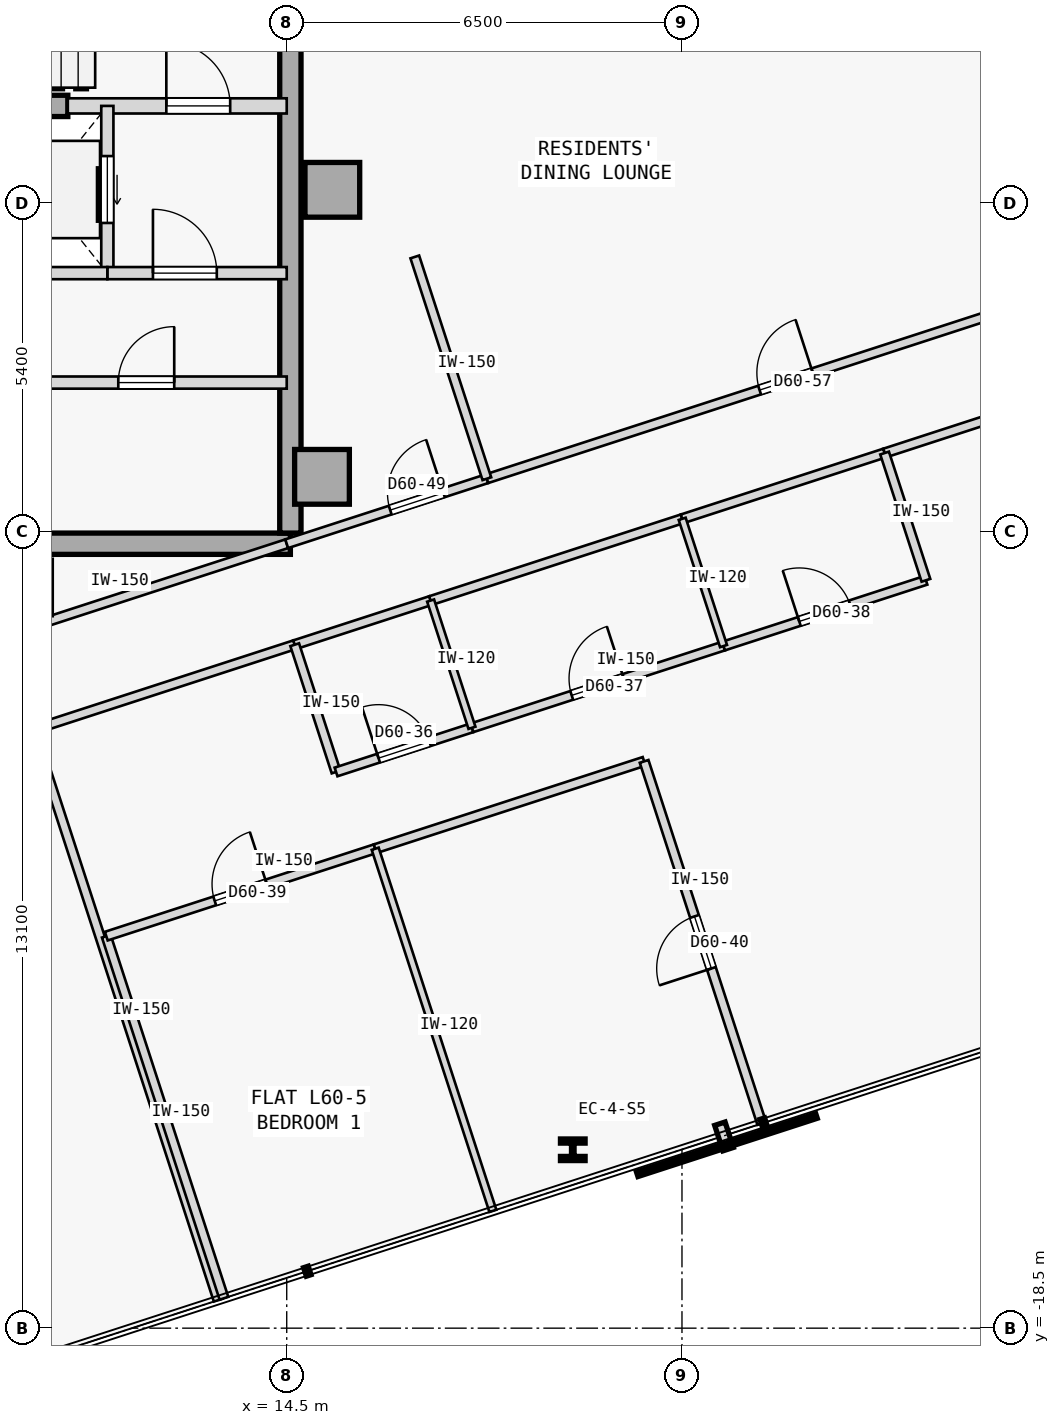
"""IFC4 building model, lengths in metres.
Left out: names, types, materials, properties, quantities, classifications, styles, units other than length and angle.
Written with IfcOpenShell. Run it as: python <this file> out.ifc"""

import sys

from ifc_helpers import new_model, si_unit, direction, frame, frame_2d, origin, origin_2d, place, context, subcontext, project, spatial, rectangle, i_section, extrude, element, fill, save


model = new_model("IFC4")
c1 = context("Model", 3, precision=1e-05, world=origin(), true_north=direction((0.0, 1.0)))
c2 = subcontext(c1, "Body", "Model", "MODEL_VIEW")
j1 = project(units=[si_unit("LENGTHUNIT", "METRE"), si_unit("PLANEANGLEUNIT", "RADIAN")], contexts=[c1])
p1 = place(None, origin())
s1 = spatial("IfcSite", under=j1, at=p1, CompositionType="ELEMENT")
p2 = place(p1, origin())
s2 = spatial("IfcBuilding", under=s1, at=p2, CompositionType="ELEMENT")
p3 = place(p2, frame((0.0, 0.0, 227.65)))
s3 = spatial("IfcBuildingStorey", under=s2, at=p3, CompositionType="ELEMENT", Elevation=227.65)
for number, where, z_axis, x_axis in (
    (1, (15.25, 0.22, 0.0), (0.0, 0.0, 1.0), (1.0, 0.0, 0.0)),
    (2, (15.08, -4.5, 0.0), (0.0, 0.0, 1.0), (1.0, 0.0, 0.0)),
):
    element("IfcColumn", number, at=place(p3, frame(where, z_axis=z_axis, x_axis=x_axis)), inside=s3, PredefinedType="COLUMN", context=c2, shape_type="SweptSolid", body=[
        extrude(rectangle(XDim=0.9, YDim=0.9, at=origin_2d()), origin(), (0.0, 0.0, 1.0), 3.35),
    ])
p4 = place(p3, frame((3.7, -5.6, 0.0), z_axis=(0.0, 0.0, 1.0), x_axis=(1.0, 0.0, 0.0)))
e3 = element("IfcWall", 3, at=p4, inside=s3, PredefinedType="SHEAR", context=c2, shape_type="SweptSolid", body=[
    extrude(rectangle(XDim=10.86, YDim=0.35, at=frame_2d((5.43, 0.0))), origin(), (0.0, 0.0, 1.0), 3.125),
])
p5 = place(p3, frame((14.56, -5.425, 0.0), z_axis=(0.0, 0.0, 1.0), x_axis=(0.0, 1.0, 0.0)))
e4 = element("IfcWall", 4, at=p5, inside=s3, PredefinedType="SHEAR", context=c2, shape_type="SweptSolid", body=[
    extrude(rectangle(XDim=10.85, YDim=0.35, at=frame_2d((5.425, 0.0))), origin(), (0.0, 0.0, 1.0), 3.125),
])
p6 = place(p3, frame((5.75, 1.6, 0.0), z_axis=(0.0, 0.0, 1.0), x_axis=(1.0, 0.0, 0.0)))
e5 = element("IfcWall", 5, at=p6, inside=s3, PredefinedType="SHEAR", context=c2, shape_type="SweptSolid", body=[
    extrude(rectangle(XDim=5.15, YDim=0.35, at=frame_2d((2.575, 0.0))), origin(), (0.0, 0.0, 1.0), 3.125),
])
p7 = place(p3, frame((19.204, -15.566, 0.0), z_axis=(0.0, 0.0, 1.0), x_axis=(1.0, 0.0, 0.0)))
e6 = element("IfcColumn", 6, at=p7, inside=s3, PredefinedType="COLUMN", context=c2, shape_type="SweptSolid", body=[
    extrude(i_section(OverallWidth=0.405, OverallDepth=0.355, WebThickness=0.042, FlangeThickness=0.068, FilletRadius=0.015, at=origin_2d()), origin(), (0.0, 0.0, 1.0), 3.35),
])
p8 = place(p3, frame((10.9, 1.6, 0.0), z_axis=(0.0, 0.0, 1.0), x_axis=(1.0, 0.0, 0.0)))
e7 = element("IfcWall", 7, at=p8, inside=s3, PredefinedType="STANDARD", context=c2, shape_type="SweptSolid", body=[
    extrude(rectangle(XDim=3.6, YDim=0.25, at=frame_2d((1.8, 0.0))), origin(), (0.0, 0.0, 1.0), 3.125),
])
p9 = place(p8, frame((1.62, 0.0, 0.0)))
e8 = element("IfcOpeningElement", 8, at=p9, cuts=e7, PredefinedType="OPENING", context=c2, shape_type="SweptSolid", body=[
    extrude(rectangle(XDim=1.05, YDim=2.15, at=frame_2d((0.525, 1.075))), frame((0.0, 0.135, 0.0), z_axis=(0.0, -1.0, 0.0), x_axis=(1.0, 0.0, 0.0)), (0.0, 0.0, 1.0), 0.27),
])
p10 = place(p3, frame((11.55, -1.15, 0.0), z_axis=(0.0, 0.0, 1.0), x_axis=(0.0, 1.0, 0.0)))
e9 = element("IfcWall", 9, at=p10, inside=s3, PredefinedType="STANDARD", context=c2, shape_type="SweptSolid", body=[
    extrude(rectangle(XDim=2.75, YDim=0.2, at=frame_2d((1.375, 0.0))), origin(), (0.0, 0.0, 1.0), 3.125),
])
p11 = place(p10, frame((0.825, 0.0, 0.0)))
e10 = element("IfcOpeningElement", 10, at=p11, cuts=e9, PredefinedType="OPENING", context=c2, shape_type="SweptSolid", body=[
    extrude(rectangle(XDim=1.1, YDim=2.15, at=frame_2d((0.55, 1.075))), frame((0.0, 0.11, 0.0), z_axis=(0.0, -1.0, 0.0), x_axis=(1.0, 0.0, 0.0)), (0.0, 0.0, 1.0), 0.22),
])
p12 = place(p3, frame((11.55, -1.15, 0.0), z_axis=(0.0, 0.0, 1.0), x_axis=(1.0, 0.0, 0.0)))
e11 = element("IfcWall", 11, at=p12, inside=s3, PredefinedType="STANDARD", context=c2, shape_type="SweptSolid", body=[
    extrude(rectangle(XDim=2.95, YDim=0.2, at=frame_2d((1.475, 0.0))), origin(), (0.0, 0.0, 1.0), 3.125),
])
p13 = place(p12, frame((0.75, 0.0, 0.0)))
e12 = element("IfcOpeningElement", 12, at=p13, cuts=e11, PredefinedType="OPENING", context=c2, shape_type="SweptSolid", body=[
    extrude(rectangle(XDim=1.05, YDim=2.18, at=frame_2d((0.525, 1.09))), frame((0.0, 0.11, 0.0), z_axis=(0.0, -1.0, 0.0), x_axis=(1.0, 0.0, 0.0)), (0.0, 0.0, 1.0), 0.22),
])
p14 = place(p3, frame((9.35, -1.15, 0.0), z_axis=(0.0, 0.0, 1.0), x_axis=(1.0, 0.0, 0.0)))
e13 = element("IfcWall", 13, at=p14, inside=s3, PredefinedType="STANDARD", context=c2, shape_type="SweptSolid", body=[
    extrude(rectangle(XDim=2.2, YDim=0.2, at=frame_2d((1.1, 0.0))), origin(), (0.0, 0.0, 1.0), 3.125),
])
p15 = place(p3, frame((3.7, -2.95, 0.0), z_axis=(0.0, 0.0, 1.0), x_axis=(1.0, 0.0, 0.0)))
e14 = element("IfcWall", 14, at=p15, inside=s3, PredefinedType="STANDARD", context=c2, shape_type="SweptSolid", body=[
    extrude(rectangle(XDim=10.8, YDim=0.2, at=frame_2d((5.4, 0.0))), origin(), (0.0, 0.0, 1.0), 3.125),
])
p16 = place(p15, frame((0.53, 0.0, 0.0)))
e15 = element("IfcOpeningElement", 15, at=p16, cuts=e14, PredefinedType="OPENING", context=c2, shape_type="SweptSolid", body=[
    extrude(rectangle(XDim=1.1, YDim=2.15, at=frame_2d((0.55, 1.075))), frame((0.0, 0.11, 0.0), z_axis=(0.0, -1.0, 0.0), x_axis=(1.0, 0.0, 0.0)), (0.0, 0.0, 1.0), 0.22),
])
p17 = place(p15, frame((3.71, 0.0, 0.0)))
e16 = element("IfcOpeningElement", 16, at=p17, cuts=e14, PredefinedType="OPENING", context=c2, shape_type="SweptSolid", body=[
    extrude(rectangle(XDim=0.92, YDim=2.15, at=frame_2d((0.46, 1.075))), frame((0.0, 0.11, 0.0), z_axis=(0.0, -1.0, 0.0), x_axis=(1.0, 0.0, 0.0)), (0.0, 0.0, 1.0), 0.22),
])
p18 = place(p15, frame((8.03, 0.0, 0.0)))
e17 = element("IfcOpeningElement", 17, at=p18, cuts=e14, PredefinedType="OPENING", context=c2, shape_type="SweptSolid", body=[
    extrude(rectangle(XDim=0.92, YDim=2.15, at=frame_2d((0.46, 1.075))), frame((0.0, 0.11, 0.0), z_axis=(0.0, -1.0, 0.0), x_axis=(1.0, 0.0, 0.0)), (0.0, 0.0, 1.0), 0.22),
])
p19 = place(p3, frame((10.325, -8.66, 0.0), z_axis=(0.0, 0.0, 1.0), x_axis=(0.95106061278, 0.309004386407, 0.0)))
e18 = element("IfcWall", 18, at=p19, inside=s3, PredefinedType="PARTITIONING", context=c2, shape_type="SweptSolid", body=[
    extrude(rectangle(XDim=4.528, YDim=0.15, at=frame_2d((2.264, 0.0))), origin(), (0.0, 0.0, 1.0), 3.125),
])
p20 = place(p3, frame((24.332, -4.109, 0.0), z_axis=(0.0, 0.0, 1.0), x_axis=(0.951058083458, 0.309012171103, 0.0)))
e19 = element("IfcWall", 19, at=p20, inside=s3, PredefinedType="PARTITIONING", context=c2, shape_type="SweptSolid", body=[
    extrude(rectangle(XDim=5.976, YDim=0.15, at=frame_2d((2.988, 0.0))), origin(), (0.0, 0.0, 1.0), 3.125),
])
p21 = place(p20, frame((2.513, 0.0, 0.0)))
e20 = element("IfcOpeningElement", 20, at=p21, cuts=e19, PredefinedType="OPENING", context=c2, shape_type="SweptSolid", body=[
    extrude(rectangle(XDim=0.95, YDim=2.15, at=frame_2d((0.475, 1.075))), frame((0.0, 0.085, 0.0), z_axis=(0.0, -1.0, 0.0), x_axis=(1.0, 0.0, 0.0)), (0.0, 0.0, 1.0), 0.17),
])
p22 = place(p3, frame((14.631, -7.261, 0.0), z_axis=(0.0, 0.0, 1.0), x_axis=(0.951066131077, 0.308987401554, 0.0)))
e21 = element("IfcWall", 21, at=p22, inside=s3, PredefinedType="PARTITIONING", context=c2, shape_type="SweptSolid", body=[
    extrude(rectangle(XDim=2.35, YDim=0.15, at=frame_2d((1.175, 0.0))), origin(), (0.0, 0.0, 1.0), 3.125),
])
p23 = place(p3, frame((16.866, -6.535, 0.0), z_axis=(0.0, 0.0, 1.0), x_axis=(0.951041492154, 0.309063230101, 0.0)))
e22 = element("IfcWall", 22, at=p23, inside=s3, PredefinedType="PARTITIONING", context=c2, shape_type="SweptSolid", body=[
    extrude(rectangle(XDim=4.35, YDim=0.15, at=frame_2d((2.175, 0.0))), origin(), (0.0, 0.0, 1.0), 3.125),
])
p24 = place(p3, frame((21.003, -5.19, 0.0), z_axis=(0.0, 0.0, 1.0), x_axis=(0.951055596592, 0.309019824916, 0.0)))
e23 = element("IfcWall", 23, at=p24, inside=s3, PredefinedType="PARTITIONING", context=c2, shape_type="SweptSolid", body=[
    extrude(rectangle(XDim=3.5, YDim=0.15, at=frame_2d((1.75, 0.0))), origin(), (0.0, 0.0, 1.0), 3.125),
])
p25 = place(p3, frame((7.588, -7.846, 0.0), z_axis=(0.0, 0.0, 1.0), x_axis=(0.951058013903, 0.309012385174, 0.0)))
e24 = element("IfcWall", 24, at=p25, inside=s3, PredefinedType="PARTITIONING", context=c2, shape_type="SweptSolid", body=[
    extrude(rectangle(XDim=7.267, YDim=0.15, at=frame_2d((3.634, 0.0))), origin(), (0.0, 0.0, 1.0), 3.125),
])
p26 = place(p25, frame((0.557, 0.0, 0.0)))
e25 = element("IfcOpeningElement", 25, at=p26, cuts=e24, PredefinedType="OPENING", context=c2, shape_type="SweptSolid", body=[
    extrude(rectangle(XDim=0.92, YDim=2.15, at=frame_2d((0.46, 1.075))), frame((0.0, 0.085, 0.0), z_axis=(0.0, -1.0, 0.0), x_axis=(1.0, 0.0, 0.0)), (0.0, 0.0, 1.0), 0.17),
])
p27 = place(p3, frame((14.5, -5.6, 0.0), z_axis=(0.0, 0.0, 1.0), x_axis=(0.951047546178, 0.309044600193, 0.0)))
e26 = element("IfcWall", 26, at=p27, inside=s3, PredefinedType="PARTITIONING", context=c2, shape_type="SweptSolid", body=[
    extrude(rectangle(XDim=3.461, YDim=0.15, at=frame_2d((1.73, 0.0))), origin(), (0.0, 0.0, 1.0), 3.125),
])
p28 = place(p27, frame((1.79, 0.0, 0.0)))
e27 = element("IfcOpeningElement", 27, at=p28, cuts=e26, PredefinedType="OPENING", context=c2, shape_type="SweptSolid", body=[
    extrude(rectangle(XDim=0.92, YDim=2.15, at=frame_2d((0.46, 1.075))), frame((0.0, 0.085, 0.0), z_axis=(0.0, -1.0, 0.0), x_axis=(1.0, 0.0, 0.0)), (0.0, 0.0, 1.0), 0.17),
])
p29 = place(p3, frame((17.791, -4.531, 0.0), z_axis=(0.0, 0.0, 1.0), x_axis=(0.951056769902, 0.309016213852, 0.0)))
e28 = element("IfcWall", 28, at=p29, inside=s3, PredefinedType="PARTITIONING", context=c2, shape_type="SweptSolid", body=[
    extrude(rectangle(XDim=10.352, YDim=0.15, at=frame_2d((5.176, 0.0))), origin(), (0.0, 0.0, 1.0), 3.125),
])
p30 = place(p29, frame((4.716, 0.0, 0.0)))
e29 = element("IfcOpeningElement", 29, at=p30, cuts=e28, PredefinedType="OPENING", context=c2, shape_type="SweptSolid", body=[
    extrude(rectangle(XDim=0.92, YDim=2.15, at=frame_2d((0.46, 1.075))), frame((0.0, 0.085, 0.0), z_axis=(0.0, -1.0, 0.0), x_axis=(1.0, 0.0, 0.0)), (0.0, 0.0, 1.0), 0.17),
])
p31 = place(p3, frame((27.637, -1.332, 0.0), z_axis=(0.0, 0.0, 1.0), x_axis=(-0.309040411618, 0.951048907253, 0.0)))
e30 = element("IfcWall", 30, at=p31, inside=s3, PredefinedType="PARTITIONING", context=c2, shape_type="SweptSolid", body=[
    extrude(rectangle(XDim=8.826, YDim=0.15, at=frame_2d((4.413, 0.0))), origin(), (0.0, 0.0, 1.0), 3.125),
])
p32 = place(p3, frame((13.372, -18.04, 0.0), z_axis=(0.0, 0.0, 1.0), x_axis=(-0.308999867152, 0.951062081097, 0.0)))
e31 = element("IfcWall", 31, at=p32, inside=s3, PredefinedType="PARTITIONING", context=c2, shape_type="SweptSolid", body=[
    extrude(rectangle(XDim=9.862, YDim=0.15, at=frame_2d((4.931, 0.0))), origin(), (0.0, 0.0, 1.0), 3.125),
])
p33 = place(p3, frame((15.311, -9.353, 0.0), z_axis=(0.0, 0.0, 1.0), x_axis=(-0.308960600764, 0.951074837842, 0.0)))
e32 = element("IfcWall", 32, at=p33, inside=s3, PredefinedType="PARTITIONING", context=c2, shape_type="SweptSolid", body=[
    extrude(rectangle(XDim=2.2, YDim=0.15, at=frame_2d((1.1, 0.0))), origin(), (0.0, 0.0, 1.0), 3.125),
])
p34 = place(p3, frame((15.311, -9.353, 0.0), z_axis=(0.0, 0.0, 1.0), x_axis=(0.951076048914, 0.308956872689, 0.0)))
e33 = element("IfcWall", 33, at=p34, inside=s3, PredefinedType="PARTITIONING", context=c2, shape_type="SweptSolid", body=[
    extrude(rectangle(XDim=2.35, YDim=0.15, at=frame_2d((1.175, 0.0))), origin(), (0.0, 0.0, 1.0), 3.125),
])
p35 = place(p34, frame((0.735, 0.0, 0.0)))
e34 = element("IfcOpeningElement", 34, at=p35, cuts=e33, PredefinedType="OPENING", context=c2, shape_type="SweptSolid", body=[
    extrude(rectangle(XDim=0.88, YDim=2.15, at=frame_2d((0.44, 1.075))), frame((0.0, 0.085, 0.0), z_axis=(0.0, -1.0, 0.0), x_axis=(1.0, 0.0, 0.0)), (0.0, 0.0, 1.0), 0.17),
])
p36 = place(p3, frame((17.546, -8.627, 0.0), z_axis=(0.0, 0.0, 1.0), x_axis=(0.951052627573, 0.309028962374, 0.0)))
e35 = element("IfcWall", 35, at=p36, inside=s3, PredefinedType="PARTITIONING", context=c2, shape_type="SweptSolid", body=[
    extrude(rectangle(XDim=4.35, YDim=0.15, at=frame_2d((2.175, 0.0))), origin(), (0.0, 0.0, 1.0), 3.125),
])
p37 = place(p36, frame((1.725, 0.0, 0.0)))
e36 = element("IfcOpeningElement", 36, at=p37, cuts=e35, PredefinedType="OPENING", context=c2, shape_type="SweptSolid", body=[
    extrude(rectangle(XDim=0.9, YDim=2.15, at=frame_2d((0.45, 1.075))), frame((0.0, 0.085, 0.0), z_axis=(0.0, -1.0, 0.0), x_axis=(1.0, 0.0, 0.0)), (0.0, 0.0, 1.0), 0.17),
])
p38 = place(p3, frame((21.683, -7.283, 0.0), z_axis=(0.0, 0.0, 1.0), x_axis=(0.951062257173, 0.308999325213, 0.0)))
e37 = element("IfcWall", 37, at=p38, inside=s3, PredefinedType="PARTITIONING", context=c2, shape_type="SweptSolid", body=[
    extrude(rectangle(XDim=3.5, YDim=0.15, at=frame_2d((1.75, 0.0))), origin(), (0.0, 0.0, 1.0), 3.125),
])
p39 = place(p38, frame((1.31, 0.0, 0.0)))
e38 = element("IfcOpeningElement", 38, at=p39, cuts=e37, PredefinedType="OPENING", context=c2, shape_type="SweptSolid", body=[
    extrude(rectangle(XDim=0.88, YDim=2.15, at=frame_2d((0.44, 1.075))), frame((0.0, 0.085, 0.0), z_axis=(0.0, -1.0, 0.0), x_axis=(1.0, 0.0, 0.0)), (0.0, 0.0, 1.0), 0.17),
])
p40 = place(p3, frame((25.012, -6.201, 0.0), z_axis=(0.0, 0.0, 1.0), x_axis=(-0.309028364152, 0.951052821956, 0.0)))
e39 = element("IfcWall", 39, at=p40, inside=s3, PredefinedType="PARTITIONING", context=c2, shape_type="SweptSolid", body=[
    extrude(rectangle(XDim=2.2, YDim=0.15, at=frame_2d((1.1, 0.0))), origin(), (0.0, 0.0, 1.0), 3.125),
])
p41 = place(p3, frame((13.468, -18.009, 0.0), z_axis=(0.0, 0.0, 1.0), x_axis=(-0.309013782848, 0.951057559777, 0.0)))
e40 = element("IfcWall", 40, at=p41, inside=s3, PredefinedType="PARTITIONING", context=c2, shape_type="SweptSolid", body=[
    extrude(rectangle(XDim=6.262, YDim=0.15, at=frame_2d((3.131, 0.0))), origin(), (0.0, 0.0, 1.0), 3.125),
])
p42 = place(p3, frame((11.532, -12.053, 0.0), z_axis=(0.0, 0.0, 1.0), x_axis=(0.951065702951, 0.308988719326, 0.0)))
e41 = element("IfcWall", 41, at=p42, inside=s3, PredefinedType="PARTITIONING", context=c2, shape_type="SweptSolid", body=[
    extrude(rectangle(XDim=4.65, YDim=0.15, at=frame_2d((2.325, 0.0))), origin(), (0.0, 0.0, 1.0), 3.125),
])
p43 = place(p42, frame((1.875, 0.0, 0.0)))
e42 = element("IfcOpeningElement", 42, at=p43, cuts=e41, PredefinedType="OPENING", context=c2, shape_type="SweptSolid", body=[
    extrude(rectangle(XDim=0.9, YDim=2.15, at=frame_2d((0.45, 1.075))), frame((0.0, 0.085, 0.0), z_axis=(0.0, -1.0, 0.0), x_axis=(1.0, 0.0, 0.0)), (0.0, 0.0, 1.0), 0.17),
])
p44 = place(p3, frame((15.955, -10.616, 0.0), z_axis=(0.0, 0.0, 1.0), x_axis=(0.951050272606, 0.309036209813, 0.0)))
e43 = element("IfcWall", 43, at=p44, inside=s3, PredefinedType="PARTITIONING", context=c2, shape_type="SweptSolid", body=[
    extrude(rectangle(XDim=4.65, YDim=0.15, at=frame_2d((2.325, 0.0))), origin(), (0.0, 0.0, 1.0), 3.125),
])
p45 = place(p3, frame((22.312, -15.135, 0.0), z_axis=(0.0, 0.0, 1.0), x_axis=(-0.309013782848, 0.951057559777, 0.0)))
e44 = element("IfcWall", 44, at=p45, inside=s3, PredefinedType="PARTITIONING", context=c2, shape_type="SweptSolid", body=[
    extrude(rectangle(XDim=6.262, YDim=0.15, at=frame_2d((3.131, 0.0))), origin(), (0.0, 0.0, 1.0), 3.125),
])
p46 = place(p45, frame((2.681, 0.0, 0.0)))
e45 = element("IfcOpeningElement", 45, at=p46, cuts=e44, PredefinedType="OPENING", context=c2, shape_type="SweptSolid", body=[
    extrude(rectangle(XDim=0.9, YDim=2.15, at=frame_2d((0.45, 1.075))), frame((0.0, 0.085, 0.0), z_axis=(0.0, -1.0, 0.0), x_axis=(1.0, 0.0, 0.0)), (0.0, 0.0, 1.0), 0.17),
])
p47 = place(p3, frame((17.546, -8.627, 0.0), z_axis=(0.0, 0.0, 1.0), x_axis=(-0.309060979314, 0.951042223598, 0.0)))
e46 = element("IfcWall", 46, at=p47, inside=s3, PredefinedType="PARTITIONING", context=c2, shape_type="SweptSolid", body=[
    extrude(rectangle(XDim=2.2, YDim=0.12, at=frame_2d((1.1, 0.0))), origin(), (0.0, 0.0, 1.0), 3.125),
])
p48 = place(p3, frame((21.683, -7.283, 0.0), z_axis=(0.0, 0.0, 1.0), x_axis=(-0.30892799396, 0.951085429679, 0.0)))
e47 = element("IfcWall", 47, at=p48, inside=s3, PredefinedType="PARTITIONING", context=c2, shape_type="SweptSolid", body=[
    extrude(rectangle(XDim=2.2, YDim=0.12, at=frame_2d((1.1, 0.0))), origin(), (0.0, 0.0, 1.0), 3.125),
])
p49 = place(p3, frame((17.89, -16.572, 0.0), z_axis=(0.0, 0.0, 1.0), x_axis=(-0.309013782848, 0.951057559777, 0.0)))
e48 = element("IfcWall", 48, at=p49, inside=s3, PredefinedType="PARTITIONING", context=c2, shape_type="SweptSolid", body=[
    extrude(rectangle(XDim=6.262, YDim=0.12, at=frame_2d((3.131, 0.0))), origin(), (0.0, 0.0, 1.0), 3.125),
])
p50 = place(p3, frame((17.791, -4.531, 0.0), z_axis=(0.0, 0.0, 1.0), x_axis=(-0.309018414265, 0.951056054944, 0.0)))
e49 = element("IfcWall", 49, at=p50, inside=s3, PredefinedType="PARTITIONING", context=c2, shape_type="SweptSolid", body=[
    extrude(rectangle(XDim=3.835, YDim=0.15, at=frame_2d((1.917, 0.0))), origin(), (0.0, 0.0, 1.0), 3.125),
])
p51 = place(p9, origin())
e50 = element("IfcDoor", 50, at=p51, inside=s3, OperationType="SINGLE_SWING_LEFT", PredefinedType="DOOR", context=c2, shape_type="SweptSolid", body=[
    extrude(rectangle(XDim=1.05, YDim=2.15, at=frame_2d((0.525, 1.075))), frame((0.0, 0.025, 0.0), z_axis=(0.0, -1.0, 0.0), x_axis=(1.0, 0.0, 0.0)), (0.0, 0.0, 1.0), 0.05),
])
fill(e8, e50)
p52 = place(p13, origin())
e51 = element("IfcDoor", 51, at=p52, inside=s3, OperationType="SINGLE_SWING_LEFT", PredefinedType="DOOR", context=c2, shape_type="SweptSolid", body=[
    extrude(rectangle(XDim=1.05, YDim=2.18, at=frame_2d((0.525, 1.09))), frame((0.0, 0.025, 0.0), z_axis=(0.0, -1.0, 0.0), x_axis=(1.0, 0.0, 0.0)), (0.0, 0.0, 1.0), 0.05),
])
fill(e12, e51)
p53 = place(p11, origin())
e52 = element("IfcDoor", 52, at=p53, inside=s3, OperationType="SLIDING_TO_RIGHT", PredefinedType="DOOR", context=c2, shape_type="SweptSolid", body=[
    extrude(rectangle(XDim=1.1, YDim=2.15, at=frame_2d((0.55, 1.075))), frame((0.0, 0.025, 0.0), z_axis=(0.0, -1.0, 0.0), x_axis=(1.0, 0.0, 0.0)), (0.0, 0.0, 1.0), 0.05),
])
fill(e10, e52)
p54 = place(p18, origin())
e53 = element("IfcDoor", 53, at=p54, inside=s3, OperationType="SINGLE_SWING_RIGHT", PredefinedType="DOOR", context=c2, shape_type="SweptSolid", body=[
    extrude(rectangle(XDim=0.92, YDim=2.15, at=frame_2d((0.46, 1.075))), frame((0.0, 0.025, 0.0), z_axis=(0.0, -1.0, 0.0), x_axis=(1.0, 0.0, 0.0)), (0.0, 0.0, 1.0), 0.05),
])
fill(e17, e53)
p55 = place(p35, origin())
e54 = element("IfcDoor", 54, at=p55, inside=s3, OperationType="SINGLE_SWING_LEFT", PredefinedType="DOOR", context=c2, shape_type="SweptSolid", body=[
    extrude(rectangle(XDim=0.88, YDim=2.15, at=frame_2d((0.44, 1.075))), frame((0.0, 0.025, 0.0), z_axis=(0.0, -1.0, 0.0), x_axis=(1.0, 0.0, 0.0)), (0.0, 0.0, 1.0), 0.05),
])
fill(e34, e54)
p56 = place(p37, origin())
e55 = element("IfcDoor", 55, at=p56, inside=s3, OperationType="SINGLE_SWING_RIGHT", PredefinedType="DOOR", context=c2, shape_type="SweptSolid", body=[
    extrude(rectangle(XDim=0.9, YDim=2.15, at=frame_2d((0.45, 1.075))), frame((0.0, 0.025, 0.0), z_axis=(0.0, -1.0, 0.0), x_axis=(1.0, 0.0, 0.0)), (0.0, 0.0, 1.0), 0.05),
])
fill(e36, e55)
p57 = place(p39, origin())
e56 = element("IfcDoor", 56, at=p57, inside=s3, OperationType="SINGLE_SWING_LEFT", PredefinedType="DOOR", context=c2, shape_type="SweptSolid", body=[
    extrude(rectangle(XDim=0.88, YDim=2.15, at=frame_2d((0.44, 1.075))), frame((0.0, 0.025, 0.0), z_axis=(0.0, -1.0, 0.0), x_axis=(1.0, 0.0, 0.0)), (0.0, 0.0, 1.0), 0.05),
])
fill(e38, e56)
p58 = place(p43, origin())
e57 = element("IfcDoor", 57, at=p58, inside=s3, OperationType="SINGLE_SWING_RIGHT", PredefinedType="DOOR", context=c2, shape_type="SweptSolid", body=[
    extrude(rectangle(XDim=0.9, YDim=2.15, at=frame_2d((0.45, 1.075))), frame((0.0, 0.025, 0.0), z_axis=(0.0, -1.0, 0.0), x_axis=(1.0, 0.0, 0.0)), (0.0, 0.0, 1.0), 0.05),
])
fill(e42, e57)
p59 = place(p46, origin())
e58 = element("IfcDoor", 58, at=p59, inside=s3, OperationType="SINGLE_SWING_LEFT", PredefinedType="DOOR", context=c2, shape_type="SweptSolid", body=[
    extrude(rectangle(XDim=0.9, YDim=2.15, at=frame_2d((0.45, 1.075))), frame((0.0, 0.025, 0.0), z_axis=(0.0, -1.0, 0.0), x_axis=(1.0, 0.0, 0.0)), (0.0, 0.0, 1.0), 0.05),
])
fill(e45, e58)
p60 = place(p28, origin())
e59 = element("IfcDoor", 59, at=p60, inside=s3, OperationType="SINGLE_SWING_RIGHT", PredefinedType="DOOR", context=c2, shape_type="SweptSolid", body=[
    extrude(rectangle(XDim=0.92, YDim=2.15, at=frame_2d((0.46, 1.075))), frame((0.0, 0.025, 0.0), z_axis=(0.0, -1.0, 0.0), x_axis=(1.0, 0.0, 0.0)), (0.0, 0.0, 1.0), 0.05),
])
fill(e27, e59)
p61 = place(p30, origin())
e60 = element("IfcDoor", 60, at=p61, inside=s3, OperationType="SINGLE_SWING_RIGHT", PredefinedType="DOOR", context=c2, shape_type="SweptSolid", body=[
    extrude(rectangle(XDim=0.92, YDim=2.15, at=frame_2d((0.46, 1.075))), frame((0.0, 0.025, 0.0), z_axis=(0.0, -1.0, 0.0), x_axis=(1.0, 0.0, 0.0)), (0.0, 0.0, 1.0), 0.05),
])
fill(e29, e60)
save(model, sys.argv[1])
